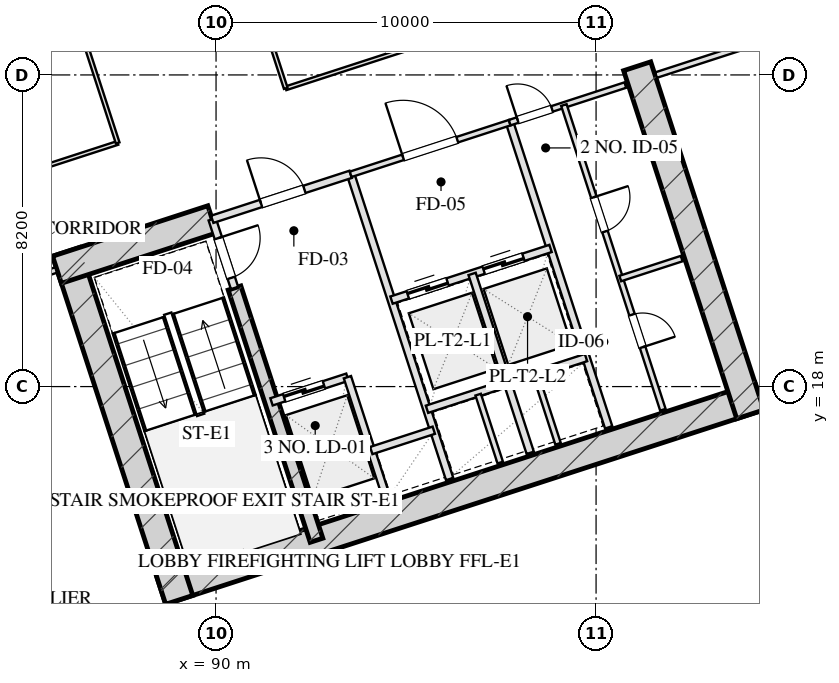
"""IFC4 building model, lengths in metres.
Left out: names, types, materials, properties, quantities, classifications, styles, units other than length and angle.
Written with IfcOpenShell. Run it as: python <this file> out.ifc"""

import sys

from ifc_helpers import new_model, si_unit, direction, frame, frame_2d, origin, place, context, subcontext, project, spatial, rectangle, extrude, element, fill, save


model = new_model("IFC4")
c1 = context("Model", 3, precision=1e-05, world=origin(), true_north=direction((0.0, 1.0)))
c2 = subcontext(c1, "Body", "Model", "MODEL_VIEW")
j1 = project(units=[si_unit("LENGTHUNIT", "METRE"), si_unit("PLANEANGLEUNIT", "RADIAN")], contexts=[c1])
p1 = place(None, origin())
s1 = spatial("IfcSite", under=j1, at=p1, CompositionType="ELEMENT")
p2 = place(p1, origin())
s2 = spatial("IfcBuilding", under=s1, at=p2, CompositionType="ELEMENT")
p3 = place(p2, frame((0.0, 0.0, 74.75)))
s3 = spatial("IfcBuildingStorey", under=s2, at=p3, CompositionType="ELEMENT", Elevation=74.75)
p4 = place(p3, frame((88.559, 12.629, 0.0), z_axis=(0.0, 0.0, 1.0), x_axis=(0.951056072937, 0.309018358888, 0.0)))
e1 = element("IfcWall", 1, at=p4, inside=s3, PredefinedType="SHEAR", context=c2, shape_type="SweptSolid", body=[
    extrude(rectangle(XDim=16.55, YDim=0.75, at=frame_2d((8.275, 0.0))), origin(), (0.0, 0.0, 1.0), 3.45),
])
p5 = place(p3, frame((86.055, 21.546, 0.0), z_axis=(0.0, 0.0, 1.0), x_axis=(0.309023585745, -0.951054374604, 0.0)))
e2 = element("IfcWall", 2, at=p5, inside=s3, PredefinedType="SHEAR", context=c2, shape_type="SweptSolid", body=[
    extrude(rectangle(XDim=9.63, YDim=0.75, at=frame_2d((4.815, 0.0))), origin(), (0.0, 0.0, 1.0), 3.45),
])
p6 = place(p3, frame((101.082, 26.429, 0.0), z_axis=(0.0, 0.0, 1.0), x_axis=(0.309016134813, -0.951056795583, 0.0)))
e3 = element("IfcWall", 3, at=p6, inside=s3, PredefinedType="SHEAR", context=c2, shape_type="SweptSolid", body=[
    extrude(rectangle(XDim=9.63, YDim=0.75, at=frame_2d((4.815, 0.0))), origin(), (0.0, 0.0, 1.0), 3.45),
])
p7 = place(p3, frame((90.486, 20.594, 0.0), z_axis=(0.0, 0.0, 1.0), x_axis=(0.309020428229, -0.951055400562, 0.0)))
e4 = element("IfcWall", 4, at=p7, inside=s3, PredefinedType="SHEAR", context=c2, shape_type="SweptSolid", body=[
    extrude(rectangle(XDim=6.98, YDim=0.35, at=frame_2d((3.49, 0.0))), origin(), (0.0, 0.0, 1.0), 3.45),
])
p8 = place(p3, frame((85.814, 21.074, 0.0), z_axis=(0.0, 0.0, 1.0), x_axis=(0.95106580992, 0.308988390074, 0.0)))
e5 = element("IfcWall", 5, at=p8, inside=s3, PredefinedType="SHEAR", context=c2, shape_type="SweptSolid", body=[
    extrude(rectangle(XDim=4.295, YDim=0.75, at=frame_2d((2.147, 0.0))), origin(), (0.0, 0.0, 1.0), 3.45),
])
p9 = place(p3, frame((100.345, 63.648, 0.0), z_axis=(0.0, 0.0, 1.0), x_axis=(0.309014526607, -0.951057318118, 0.0)))
e6 = element("IfcWall", 6, at=p9, inside=s3, PredefinedType="SOLIDWALL", context=c2, shape_type="SweptSolid", body=[
    extrude(rectangle(XDim=50.0, YDim=0.4, at=frame_2d((25.0, 0.0))), origin(), (0.0, 0.0, 1.0), 2.61),
])
p10 = place(p3, frame((113.998, 12.567, 0.0), z_axis=(0.0, 0.0, 1.0), x_axis=(-0.951055939317, -0.309018770125, 0.0)))
e7 = element("IfcWall", 7, at=p10, inside=s3, PredefinedType="SOLIDWALL", context=c2, shape_type="SweptSolid", body=[
    extrude(rectangle(XDim=32.4, YDim=0.4, at=frame_2d((16.2, 0.0))), origin(), (0.0, 0.0, 1.0), 2.61),
])
p11 = place(p3, frame((89.899, 22.401, 0.0), z_axis=(0.0, 0.0, 1.0), x_axis=(0.308932062672, -0.951084108086, 0.0)))
e8 = element("IfcWall", 8, at=p11, inside=s3, PredefinedType="PARTITIONING", context=c2, shape_type="SweptSolid", body=[
    extrude(rectangle(XDim=1.9, YDim=0.2, at=frame_2d((0.95, 0.0))), origin(), (0.0, 0.0, 1.0), 3.175),
])
p12 = place(p11, frame((0.52, 0.0, 0.0)))
e9 = element("IfcOpeningElement", 9, at=p12, cuts=e8, PredefinedType="OPENING", context=c2, shape_type="SweptSolid", body=[
    extrude(rectangle(XDim=1.1, YDim=2.05, at=frame_2d((0.55, 1.025))), frame((0.0, 0.11, 0.0), z_axis=(0.0, -1.0, 0.0), x_axis=(1.0, 0.0, 0.0)), (0.0, 0.0, 1.0), 0.22),
])
p13 = place(p3, frame((93.542, 23.585, 0.0), z_axis=(0.0, 0.0, 1.0), x_axis=(0.309042196757, -0.951048327176, 0.0)))
e10 = element("IfcWall", 10, at=p13, inside=s3, PredefinedType="PARTITIONING", context=c2, shape_type="SweptSolid", body=[
    extrude(rectangle(XDim=8.43, YDim=0.2, at=frame_2d((4.215, 0.0))), origin(), (0.0, 0.0, 1.0), 3.175),
])
p14 = place(p3, frame((89.899, 22.401, 0.0), z_axis=(0.0, 0.0, 1.0), x_axis=(0.951046716504, 0.309047153403, 0.0)))
e11 = element("IfcWall", 11, at=p14, inside=s3, PredefinedType="PARTITIONING", context=c2, shape_type="SweptSolid", body=[
    extrude(rectangle(XDim=3.83, YDim=0.2, at=frame_2d((1.915, 0.0))), origin(), (0.0, 0.0, 1.0), 3.175),
])
p15 = place(p14, frame((1.35, 0.0, 0.0)))
e12 = element("IfcOpeningElement", 12, at=p15, cuts=e11, PredefinedType="OPENING", context=c2, shape_type="SweptSolid", body=[
    extrude(rectangle(XDim=1.2, YDim=2.05, at=frame_2d((0.6, 1.025))), frame((0.0, 0.11, 0.0), z_axis=(0.0, -1.0, 0.0), x_axis=(1.0, 0.0, 0.0)), (0.0, 0.0, 1.0), 0.22),
])
p16 = place(p3, frame((91.46, 17.598, 0.0), z_axis=(0.0, 0.0, 1.0), x_axis=(0.951062257173, 0.308999325213, 0.0)))
e13 = element("IfcWall", 13, at=p16, inside=s3, PredefinedType="PARTITIONING", context=c2, shape_type="SweptSolid", body=[
    extrude(rectangle(XDim=2.1, YDim=0.2, at=frame_2d((1.05, 0.0))), origin(), (0.0, 0.0, 1.0), 3.175),
])
p17 = place(p16, frame((0.35, 0.0, 0.0)))
e14 = element("IfcOpeningElement", 14, at=p17, cuts=e13, PredefinedType="OPENING", context=c2, shape_type="SweptSolid", body=[
    extrude(rectangle(XDim=1.1, YDim=2.05, at=frame_2d((0.55, 1.025))), frame((0.0, 0.11, 0.0), z_axis=(0.0, -1.0, 0.0), x_axis=(1.0, 0.0, 0.0)), (0.0, 0.0, 1.0), 0.22),
])
p18 = place(p3, frame((93.457, 18.247, 0.0), z_axis=(0.0, 0.0, 1.0), x_axis=(0.3089935693, -0.951064127245, 0.0)))
e15 = element("IfcWall", 15, at=p18, inside=s3, PredefinedType="PARTITIONING", context=c2, shape_type="SweptSolid", body=[
    extrude(rectangle(XDim=3.7, YDim=0.2, at=frame_2d((1.85, 0.0))), origin(), (0.0, 0.0, 1.0), 3.175),
])
p19 = place(p3, frame((94.084, 16.317, 0.0), z_axis=(0.0, 0.0, 1.0), x_axis=(0.951041328149, 0.309063734775, 0.0)))
e16 = element("IfcWall", 16, at=p19, inside=s3, PredefinedType="PARTITIONING", context=c2, shape_type="SweptSolid", body=[
    extrude(rectangle(XDim=1.73, YDim=0.2, at=frame_2d((0.865, 0.0))), origin(), (0.0, 0.0, 1.0), 3.175),
])
p20 = place(p3, frame((97.727, 24.944, 0.0), z_axis=(0.0, 0.0, 1.0), x_axis=(0.309016001439, -0.951056838919, 0.0)))
e17 = element("IfcWall", 17, at=p20, inside=s3, PredefinedType="PARTITIONING", context=c2, shape_type="SweptSolid", body=[
    extrude(rectangle(XDim=8.43, YDim=0.2, at=frame_2d((4.215, 0.0))), origin(), (0.0, 0.0, 1.0), 3.175),
])
p21 = place(p3, frame((93.542, 23.585, 0.0), z_axis=(0.0, 0.0, 1.0), x_axis=(0.951063829732, 0.308994485023, 0.0)))
e18 = element("IfcWall", 18, at=p21, inside=s3, PredefinedType="PARTITIONING", context=c2, shape_type="SweptSolid", body=[
    extrude(rectangle(XDim=4.4, YDim=0.15, at=frame_2d((2.2, 0.0))), origin(), (0.0, 0.0, 1.0), 3.175),
])
p22 = place(p21, frame((1.45, 0.0, 0.0)))
e19 = element("IfcOpeningElement", 19, at=p22, cuts=e18, PredefinedType="OPENING", context=c2, shape_type="SweptSolid", body=[
    extrude(rectangle(XDim=1.5, YDim=2.05, at=frame_2d((0.75, 1.025))), frame((0.0, 0.085, 0.0), z_axis=(0.0, -1.0, 0.0), x_axis=(1.0, 0.0, 0.0)), (0.0, 0.0, 1.0), 0.17),
])
p23 = place(p3, frame((94.617, 20.275, 0.0), z_axis=(0.0, 0.0, 1.0), x_axis=(0.951058531764, 0.30901079133, 0.0)))
e20 = element("IfcWall", 20, at=p23, inside=s3, PredefinedType="PARTITIONING", context=c2, shape_type="SweptSolid", body=[
    extrude(rectangle(XDim=4.4, YDim=0.2, at=frame_2d((2.2, 0.0))), origin(), (0.0, 0.0, 1.0), 3.175),
])
p24 = place(p23, frame((0.45, 0.0, 0.0)))
e21 = element("IfcOpeningElement", 21, at=p24, cuts=e20, PredefinedType="OPENING", context=c2, shape_type="SweptSolid", body=[
    extrude(rectangle(XDim=1.1, YDim=2.05, at=frame_2d((0.55, 1.025))), frame((0.0, 0.11, 0.0), z_axis=(0.0, -1.0, 0.0), x_axis=(1.0, 0.0, 0.0)), (0.0, 0.0, 1.0), 0.22),
])
p25 = place(p23, frame((2.55, 0.0, 0.0)))
e22 = element("IfcOpeningElement", 22, at=p25, cuts=e20, PredefinedType="OPENING", context=c2, shape_type="SweptSolid", body=[
    extrude(rectangle(XDim=1.1, YDim=2.05, at=frame_2d((0.55, 1.025))), frame((0.0, 0.11, 0.0), z_axis=(0.0, -1.0, 0.0), x_axis=(1.0, 0.0, 0.0)), (0.0, 0.0, 1.0), 0.22),
])
p26 = place(p3, frame((96.738, 20.964, 0.0), z_axis=(0.0, 0.0, 1.0), x_axis=(0.309042578481, -0.951048203135, 0.0)))
e23 = element("IfcWall", 23, at=p26, inside=s3, PredefinedType="PARTITIONING", context=c2, shape_type="SweptSolid", body=[
    extrude(rectangle(XDim=4.95, YDim=0.2, at=frame_2d((2.475, 0.0))), origin(), (0.0, 0.0, 1.0), 3.175),
])
p27 = place(p3, frame((95.551, 17.403, 0.0), z_axis=(0.0, 0.0, 1.0), x_axis=(0.951058531764, 0.30901079133, 0.0)))
e24 = element("IfcWall", 24, at=p27, inside=s3, PredefinedType="PARTITIONING", context=c2, shape_type="SweptSolid", body=[
    extrude(rectangle(XDim=4.4, YDim=0.2, at=frame_2d((2.2, 0.0))), origin(), (0.0, 0.0, 1.0), 3.175),
])
p28 = place(p3, frame((96.897, 17.788, 0.0), z_axis=(0.0, 0.0, 1.0), x_axis=(0.30897153969, -0.951071284217, 0.0)))
e25 = element("IfcWall", 25, at=p28, inside=s3, PredefinedType="PARTITIONING", context=c2, shape_type="SweptSolid", body=[
    extrude(rectangle(XDim=1.88, YDim=0.15, at=frame_2d((0.94, 0.0))), origin(), (0.0, 0.0, 1.0), 3.175),
])
p29 = place(p3, frame((98.419, 18.282, 0.0), z_axis=(0.0, 0.0, 1.0), x_axis=(0.308933380006, -0.951083680187, 0.0)))
e26 = element("IfcWall", 26, at=p29, inside=s3, PredefinedType="PARTITIONING", context=c2, shape_type="SweptSolid", body=[
    extrude(rectangle(XDim=1.88, YDim=0.15, at=frame_2d((0.94, 0.0))), origin(), (0.0, 0.0, 1.0), 3.175),
])
p30 = place(p3, frame((97.727, 24.944, 0.0), z_axis=(0.0, 0.0, 1.0), x_axis=(0.951036872128, 0.309077446369, 0.0)))
e27 = element("IfcWall", 27, at=p30, inside=s3, PredefinedType="PARTITIONING", context=c2, shape_type="SweptSolid", body=[
    extrude(rectangle(XDim=3.2, YDim=0.15, at=frame_2d((1.6, 0.0))), origin(), (0.0, 0.0, 1.0), 3.175),
])
p31 = place(p30, frame((0.22, 0.0, 0.0)))
e28 = element("IfcOpeningElement", 28, at=p31, cuts=e27, PredefinedType="OPENING", context=c2, shape_type="SweptSolid", body=[
    extrude(rectangle(XDim=0.95, YDim=2.05, at=frame_2d((0.475, 1.025))), frame((0.0, 0.085, 0.0), z_axis=(0.0, -1.0, 0.0), x_axis=(1.0, 0.0, 0.0)), (0.0, 0.0, 1.0), 0.17),
])
p32 = place(p3, frame((99.153, 25.408, 0.0), z_axis=(0.0, 0.0, 1.0), x_axis=(0.309016001439, -0.951056838919, 0.0)))
e29 = element("IfcWall", 29, at=p32, inside=s3, PredefinedType="PARTITIONING", context=c2, shape_type="SweptSolid", body=[
    extrude(rectangle(XDim=8.43, YDim=0.15, at=frame_2d((4.215, 0.0))), origin(), (0.0, 0.0, 1.0), 3.175),
])
p33 = place(p32, frame((2.55, 0.0, 0.0)))
e30 = element("IfcOpeningElement", 30, at=p33, cuts=e29, PredefinedType="OPENING", context=c2, shape_type="SweptSolid", body=[
    extrude(rectangle(XDim=0.95, YDim=2.05, at=frame_2d((0.475, 1.025))), frame((0.0, 0.085, 0.0), z_axis=(0.0, -1.0, 0.0), x_axis=(1.0, 0.0, 0.0)), (0.0, 0.0, 1.0), 0.17),
])
p34 = place(p32, frame((5.8, 0.0, 0.0)))
e31 = element("IfcOpeningElement", 31, at=p34, cuts=e29, PredefinedType="OPENING", context=c2, shape_type="SweptSolid", body=[
    extrude(rectangle(XDim=0.9, YDim=2.05, at=frame_2d((0.45, 1.025))), frame((0.0, 0.085, 0.0), z_axis=(0.0, -1.0, 0.0), x_axis=(1.0, 0.0, 0.0)), (0.0, 0.0, 1.0), 0.17),
])
p35 = place(p3, frame((100.636, 20.843, 0.0), z_axis=(0.0, 0.0, 1.0), x_axis=(0.951040401051, 0.309066587596, 0.0)))
e32 = element("IfcWall", 32, at=p35, inside=s3, PredefinedType="PARTITIONING", context=c2, shape_type="SweptSolid", body=[
    extrude(rectangle(XDim=1.7, YDim=0.15, at=frame_2d((0.85, 0.0))), origin(), (0.0, 0.0, 1.0), 3.175),
])
p36 = place(p3, frame((75.519, 17.729, 0.0), z_axis=(0.0, 0.0, 1.0), x_axis=(0.951056658866, 0.309016555588, 0.0)))
e33 = element("IfcWall", 33, at=p36, inside=s3, PredefinedType="PARTITIONING", context=c2, shape_type="SweptSolid", body=[
    extrude(rectangle(XDim=10.8, YDim=0.15, at=frame_2d((5.4, 0.0))), origin(), (0.0, 0.0, 1.0), 2.15),
])
p37 = place(p36, frame((4.536, 0.0, 0.0)))
e34 = element("IfcOpeningElement", 34, at=p37, cuts=e33, PredefinedType="OPENING", context=c2, shape_type="SweptSolid", body=[
    extrude(rectangle(XDim=1.0, YDim=2.05, at=frame_2d((0.5, 1.025))), frame((0.0, 0.085, 0.0), z_axis=(0.0, -1.0, 0.0), x_axis=(1.0, 0.0, 0.0)), (0.0, 0.0, 1.0), 0.17),
])
p38 = place(p3, frame((101.578, 26.196, 0.0), z_axis=(0.0, 0.0, 1.0), x_axis=(0.951059043131, 0.309009217467, 0.0)))
e35 = element("IfcWall", 35, at=p38, inside=s3, PredefinedType="PARTITIONING", context=c2, shape_type="SweptSolid", body=[
    extrude(rectangle(XDim=10.2, YDim=0.15, at=frame_2d((5.1, 0.0))), origin(), (0.0, 0.0, 1.0), 2.15),
])
p39 = place(p38, frame((4.284, 0.0, 0.0)))
e36 = element("IfcOpeningElement", 36, at=p39, cuts=e35, PredefinedType="OPENING", context=c2, shape_type="SweptSolid", body=[
    extrude(rectangle(XDim=1.0, YDim=2.05, at=frame_2d((0.5, 1.025))), frame((0.0, 0.085, 0.0), z_axis=(0.0, -1.0, 0.0), x_axis=(1.0, 0.0, 0.0)), (0.0, 0.0, 1.0), 0.17),
])
p40 = place(p3, frame((74.691, 20.278, 0.0), z_axis=(0.0, 0.0, 1.0), x_axis=(0.951052712421, 0.309028701251, 0.0)))
e37 = element("IfcWall", 37, at=p40, inside=s3, PredefinedType="MOVABLE", context=c2, shape_type="SweptSolid", body=[
    extrude(rectangle(XDim=13.375, YDim=0.1, at=frame_2d((6.688, 0.0))), origin(), (0.0, 0.0, 1.0), 3.175),
])
p41 = place(p3, frame((91.834, 25.848, 0.0), z_axis=(0.0, 0.0, 1.0), x_axis=(0.951055605195, 0.309019798438, 0.0)))
e38 = element("IfcWall", 38, at=p41, inside=s3, PredefinedType="MOVABLE", context=c2, shape_type="SweptSolid", body=[
    extrude(rectangle(XDim=19.575, YDim=0.1, at=frame_2d((9.788, 0.0))), origin(), (0.0, 0.0, 1.0), 3.175),
])
p42 = place(p3, frame((87.412, 24.411, 0.0), z_axis=(0.0, 0.0, 1.0), x_axis=(-0.309022042254, 0.951054876125, 0.0)))
e39 = element("IfcWall", 39, at=p42, inside=s3, PredefinedType="MOVABLE", context=c2, shape_type="SweptSolid", body=[
    extrude(rectangle(XDim=16.64, YDim=0.1, at=frame_2d((8.32, 0.0))), origin(), (0.0, 0.0, 1.0), 3.175),
])
p43 = place(p42, frame((3.32, 0.0, 0.0)))
e40 = element("IfcOpeningElement", 40, at=p43, cuts=e39, PredefinedType="OPENING", context=c2, shape_type="SweptSolid", body=[
    extrude(rectangle(XDim=1.0, YDim=2.05, at=frame_2d((0.5, 1.025))), frame((0.0, 0.06, 0.0), z_axis=(0.0, -1.0, 0.0), x_axis=(1.0, 0.0, 0.0)), (0.0, 0.0, 1.0), 0.12),
])
p44 = place(p42, frame((11.64, 0.0, 0.0)))
e41 = element("IfcOpeningElement", 41, at=p44, cuts=e39, PredefinedType="OPENING", context=c2, shape_type="SweptSolid", body=[
    extrude(rectangle(XDim=1.0, YDim=2.05, at=frame_2d((0.5, 1.025))), frame((0.0, 0.06, 0.0), z_axis=(0.0, -1.0, 0.0), x_axis=(1.0, 0.0, 0.0)), (0.0, 0.0, 1.0), 0.12),
])
p45 = place(p3, frame((91.834, 25.848, 0.0), z_axis=(0.0, 0.0, 1.0), x_axis=(-0.30901773025, 0.951056277195, 0.0)))
e42 = element("IfcWall", 42, at=p45, inside=s3, PredefinedType="MOVABLE", context=c2, shape_type="SweptSolid", body=[
    extrude(rectangle(XDim=16.64, YDim=0.1, at=frame_2d((8.32, 0.0))), origin(), (0.0, 0.0, 1.0), 3.175),
])
p46 = place(p45, frame((1.16, 0.0, 0.0)))
e43 = element("IfcOpeningElement", 43, at=p46, cuts=e42, PredefinedType="OPENING", context=c2, shape_type="SweptSolid", body=[
    extrude(rectangle(XDim=1.05, YDim=2.05, at=frame_2d((0.525, 1.025))), frame((0.0, 0.06, 0.0), z_axis=(0.0, -1.0, 0.0), x_axis=(1.0, 0.0, 0.0)), (0.0, 0.0, 1.0), 0.12),
])
p47 = place(p45, frame((5.48, 0.0, 0.0)))
e44 = element("IfcOpeningElement", 44, at=p47, cuts=e42, PredefinedType="OPENING", context=c2, shape_type="SweptSolid", body=[
    extrude(rectangle(XDim=1.0, YDim=2.05, at=frame_2d((0.5, 1.025))), frame((0.0, 0.06, 0.0), z_axis=(0.0, -1.0, 0.0), x_axis=(1.0, 0.0, 0.0)), (0.0, 0.0, 1.0), 0.12),
])
p48 = place(p45, frame((8.08, 0.0, 0.0)))
e45 = element("IfcOpeningElement", 45, at=p48, cuts=e42, PredefinedType="OPENING", context=c2, shape_type="SweptSolid", body=[
    extrude(rectangle(XDim=0.85, YDim=2.05, at=frame_2d((0.425, 1.025))), frame((0.0, 0.06, 0.0), z_axis=(0.0, -1.0, 0.0), x_axis=(1.0, 0.0, 0.0)), (0.0, 0.0, 1.0), 0.12),
])
p49 = place(p45, frame((10.874, 0.0, 0.0)))
e46 = element("IfcOpeningElement", 46, at=p49, cuts=e42, PredefinedType="OPENING", context=c2, shape_type="SweptSolid", body=[
    extrude(rectangle(XDim=1.0, YDim=2.05, at=frame_2d((0.5, 1.025))), frame((0.0, 0.06, 0.0), z_axis=(0.0, -1.0, 0.0), x_axis=(1.0, 0.0, 0.0)), (0.0, 0.0, 1.0), 0.12),
])
p50 = place(p45, frame((14.174, 0.0, 0.0)))
e47 = element("IfcOpeningElement", 47, at=p50, cuts=e42, PredefinedType="OPENING", context=c2, shape_type="SweptSolid", body=[
    extrude(rectangle(XDim=1.0, YDim=2.05, at=frame_2d((0.5, 1.025))), frame((0.0, 0.06, 0.0), z_axis=(0.0, -1.0, 0.0), x_axis=(1.0, 0.0, 0.0)), (0.0, 0.0, 1.0), 0.12),
])
p51 = place(p12, origin())
e48 = element("IfcDoor", 48, at=p51, inside=s3, OperationType="SINGLE_SWING_LEFT", PredefinedType="DOOR", context=c2, shape_type="SweptSolid", body=[
    extrude(rectangle(XDim=1.1, YDim=2.05, at=frame_2d((0.55, 1.025))), frame((0.0, 0.025, 0.0), z_axis=(0.0, -1.0, 0.0), x_axis=(1.0, 0.0, 0.0)), (0.0, 0.0, 1.0), 0.05),
])
fill(e9, e48)
p52 = place(p15, origin())
e49 = element("IfcDoor", 49, at=p52, inside=s3, OperationType="SINGLE_SWING_LEFT", PredefinedType="DOOR", context=c2, shape_type="SweptSolid", body=[
    extrude(rectangle(XDim=1.2, YDim=2.05, at=frame_2d((0.6, 1.025))), frame((0.0, 0.025, 0.0), z_axis=(0.0, -1.0, 0.0), x_axis=(1.0, 0.0, 0.0)), (0.0, 0.0, 1.0), 0.05),
])
fill(e12, e49)
p53 = place(p17, origin())
e50 = element("IfcDoor", 50, at=p53, inside=s3, OperationType="DOUBLE_DOOR_SLIDING", PredefinedType="DOOR", context=c2, shape_type="SweptSolid", body=[
    extrude(rectangle(XDim=1.1, YDim=2.05, at=frame_2d((0.55, 1.025))), frame((0.0, 0.025, 0.0), z_axis=(0.0, -1.0, 0.0), x_axis=(1.0, 0.0, 0.0)), (0.0, 0.0, 1.0), 0.05),
])
fill(e14, e50)
p54 = place(p22, origin())
e51 = element("IfcDoor", 51, at=p54, inside=s3, OperationType="SINGLE_SWING_LEFT", PredefinedType="DOOR", context=c2, shape_type="SweptSolid", body=[
    extrude(rectangle(XDim=1.5, YDim=2.05, at=frame_2d((0.75, 1.025))), frame((0.0, 0.025, 0.0), z_axis=(0.0, -1.0, 0.0), x_axis=(1.0, 0.0, 0.0)), (0.0, 0.0, 1.0), 0.05),
])
fill(e19, e51)
p55 = place(p24, origin())
e52 = element("IfcDoor", 52, at=p55, inside=s3, OperationType="DOUBLE_DOOR_SLIDING", PredefinedType="DOOR", context=c2, shape_type="SweptSolid", body=[
    extrude(rectangle(XDim=1.1, YDim=2.05, at=frame_2d((0.55, 1.025))), frame((0.0, 0.025, 0.0), z_axis=(0.0, -1.0, 0.0), x_axis=(1.0, 0.0, 0.0)), (0.0, 0.0, 1.0), 0.05),
])
fill(e21, e52)
p56 = place(p25, origin())
e53 = element("IfcDoor", 53, at=p56, inside=s3, OperationType="DOUBLE_DOOR_SLIDING", PredefinedType="DOOR", context=c2, shape_type="SweptSolid", body=[
    extrude(rectangle(XDim=1.1, YDim=2.05, at=frame_2d((0.55, 1.025))), frame((0.0, 0.025, 0.0), z_axis=(0.0, -1.0, 0.0), x_axis=(1.0, 0.0, 0.0)), (0.0, 0.0, 1.0), 0.05),
])
fill(e22, e53)
p57 = place(p31, origin())
e54 = element("IfcDoor", 54, at=p57, inside=s3, OperationType="SINGLE_SWING_LEFT", PredefinedType="DOOR", context=c2, shape_type="SweptSolid", body=[
    extrude(rectangle(XDim=0.95, YDim=2.05, at=frame_2d((0.475, 1.025))), frame((0.0, 0.025, 0.0), z_axis=(0.0, -1.0, 0.0), x_axis=(1.0, 0.0, 0.0)), (0.0, 0.0, 1.0), 0.05),
])
fill(e28, e54)
p58 = place(p33, origin())
e55 = element("IfcDoor", 55, at=p58, inside=s3, OperationType="SINGLE_SWING_LEFT", PredefinedType="DOOR", context=c2, shape_type="SweptSolid", body=[
    extrude(rectangle(XDim=0.95, YDim=2.05, at=frame_2d((0.475, 1.025))), frame((0.0, 0.025, 0.0), z_axis=(0.0, -1.0, 0.0), x_axis=(1.0, 0.0, 0.0)), (0.0, 0.0, 1.0), 0.05),
])
fill(e30, e55)
p59 = place(p34, origin())
e56 = element("IfcDoor", 56, at=p59, inside=s3, OperationType="SINGLE_SWING_RIGHT", PredefinedType="DOOR", context=c2, shape_type="SweptSolid", body=[
    extrude(rectangle(XDim=0.9, YDim=2.05, at=frame_2d((0.45, 1.025))), frame((0.0, 0.025, 0.0), z_axis=(0.0, -1.0, 0.0), x_axis=(1.0, 0.0, 0.0)), (0.0, 0.0, 1.0), 0.05),
])
fill(e31, e56)
save(model, sys.argv[1])
